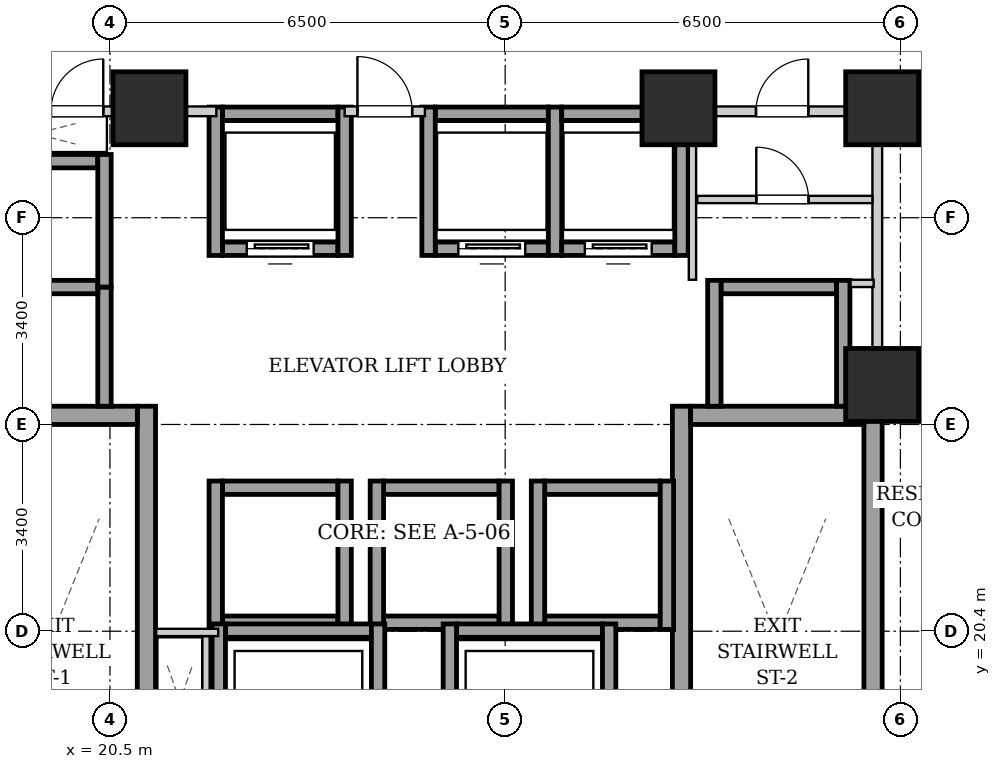
"""IFC4 building model, lengths in metres.
Left out: names, types, materials, properties, quantities, classifications, styles, units other than length and angle.
Written with IfcOpenShell. Run it as: python <this file> out.ifc"""

import sys

from ifc_helpers import new_model, si_unit, direction, frame, frame_2d, origin, origin_2d, place, context, subcontext, project, spatial, rectangle, extrude, element, fill, save


model = new_model("IFC4")
c1 = context("Model", 3, precision=1e-05, world=origin(), true_north=direction((0.0, 1.0)))
c2 = subcontext(c1, "Body", "Model", "MODEL_VIEW")
j1 = project(units=[si_unit("LENGTHUNIT", "METRE"), si_unit("PLANEANGLEUNIT", "RADIAN")], contexts=[c1])
p1 = place(None, origin())
s1 = spatial("IfcSite", under=j1, at=p1, CompositionType="ELEMENT")
p2 = place(p1, origin())
s2 = spatial("IfcBuilding", under=s1, at=p2, CompositionType="ELEMENT")
p3 = place(p2, frame((0.0, 0.0, 41.8)))
s3 = spatial("IfcBuildingStorey", under=s2, at=p3, CompositionType="ELEMENT", Elevation=41.8)
for number, where, z_axis, x_axis in (
    (1, (21.15, 29.0, 0.0), (0.0, 0.0, 1.0), (1.0, 0.0, 0.0)),
    (2, (29.85, 29.0, 0.0), (0.0, 0.0, 1.0), (1.0, 0.0, 0.0)),
    (3, (33.2, 29.0, 0.0), (0.0, 0.0, 1.0), (1.0, 0.0, 0.0)),
    (4, (33.2, 24.45, 0.0), (0.0, 0.0, 1.0), (1.0, 0.0, 0.0)),
):
    element("IfcColumn", number, at=place(p3, frame(where, z_axis=z_axis, x_axis=x_axis)), inside=s3, PredefinedType="COLUMN", context=c2, shape_type="SweptSolid", body=[
        extrude(rectangle(XDim=1.2, YDim=1.2, at=origin_2d()), origin(), (0.0, 0.0, 1.0), 3.2),
    ])
p4 = place(p3, frame((21.1, 15.1, 0.0), z_axis=(0.0, 0.0, 1.0), x_axis=(0.0, 1.0, 0.0)))
e5 = element("IfcWall", 5, at=p4, inside=s3, PredefinedType="SHEAR", context=c2, shape_type="SweptSolid", body=[
    extrude(rectangle(XDim=9.0, YDim=0.3, at=frame_2d((4.5, 0.0))), origin(), (0.0, 0.0, 1.0), 2.94),
])
p5 = place(p3, frame((18.1, 23.95, 0.0), z_axis=(0.0, 0.0, 1.0), x_axis=(1.0, 0.0, 0.0)))
e6 = element("IfcWall", 6, at=p5, inside=s3, PredefinedType="SHEAR", context=c2, shape_type="SweptSolid", body=[
    extrude(rectangle(XDim=2.85, YDim=0.3, at=frame_2d((1.425, 0.0))), origin(), (0.0, 0.0, 1.0), 2.94),
])
for number, where, z_axis, x_axis in (
    (7, (29.9, 15.1, 0.0), (0.0, 0.0, 1.0), (0.0, 1.0, 0.0)),
    (8, (33.05, 15.1, 0.0), (0.0, 0.0, 1.0), (0.0, 1.0, 0.0)),
):
    element("IfcWall", number, at=place(p3, frame(where, z_axis=z_axis, x_axis=x_axis)), inside=s3, PredefinedType="SHEAR", context=c2, shape_type="SweptSolid", body=[
        extrude(rectangle(XDim=9.0, YDim=0.3, at=frame_2d((4.5, 0.0))), origin(), (0.0, 0.0, 1.0), 2.94),
    ])
p6 = place(p3, frame((30.05, 23.95, 0.0), z_axis=(0.0, 0.0, 1.0), x_axis=(1.0, 0.0, 0.0)))
e9 = element("IfcWall", 9, at=p6, inside=s3, PredefinedType="SHEAR", context=c2, shape_type="SweptSolid", body=[
    extrude(rectangle(XDim=2.85, YDim=0.3, at=frame_2d((1.425, 0.0))), origin(), (0.0, 0.0, 1.0), 2.94),
])
p7 = place(p3, frame((22.35, 26.69, 0.0), z_axis=(0.0, 0.0, 1.0), x_axis=(1.0, 0.0, 0.0)))
e10 = element("IfcWall", 10, at=p7, inside=s3, PredefinedType="SHEAR", context=c2, shape_type="SweptSolid", body=[
    extrude(rectangle(XDim=1.9, YDim=0.22, at=frame_2d((0.95, 0.0))), origin(), (0.0, 0.0, 1.0), 2.94),
])
p8 = place(p7, frame((0.4, 0.0, 0.0)))
e11 = element("IfcOpeningElement", 11, at=p8, cuts=e10, PredefinedType="OPENING", context=c2, shape_type="SweptSolid", body=[
    extrude(rectangle(XDim=1.1, YDim=2.15, at=frame_2d((0.55, 1.075))), frame((0.0, 0.12, 0.0), z_axis=(0.0, -1.0, 0.0), x_axis=(1.0, 0.0, 0.0)), (0.0, 0.0, 1.0), 0.24),
])
p9 = place(p3, frame((22.35, 28.91, 0.0), z_axis=(0.0, 0.0, 1.0), x_axis=(1.0, 0.0, 0.0)))
e12 = element("IfcWall", 12, at=p9, inside=s3, PredefinedType="SHEAR", context=c2, shape_type="SweptSolid", body=[
    extrude(rectangle(XDim=1.9, YDim=0.22, at=frame_2d((0.95, 0.0))), origin(), (0.0, 0.0, 1.0), 2.94),
])
for number, where, z_axis, x_axis in (
    (13, (22.24, 26.58, 0.0), (0.0, 0.0, 1.0), (0.0, 1.0, 0.0)),
    (14, (24.36, 26.58, 0.0), (0.0, 0.0, 1.0), (0.0, 1.0, 0.0)),
):
    element("IfcWall", number, at=place(p3, frame(where, z_axis=z_axis, x_axis=x_axis)), inside=s3, PredefinedType="SHEAR", context=c2, shape_type="SweptSolid", body=[
        extrude(rectangle(XDim=2.44, YDim=0.22, at=frame_2d((1.22, 0.0))), origin(), (0.0, 0.0, 1.0), 2.94),
    ])
p10 = place(p3, frame((25.85, 26.69, 0.0), z_axis=(0.0, 0.0, 1.0), x_axis=(1.0, 0.0, 0.0)))
e15 = element("IfcWall", 15, at=p10, inside=s3, PredefinedType="SHEAR", context=c2, shape_type="SweptSolid", body=[
    extrude(rectangle(XDim=1.86, YDim=0.22, at=frame_2d((0.93, 0.0))), origin(), (0.0, 0.0, 1.0), 2.94),
])
p11 = place(p10, frame((0.38, 0.0, 0.0)))
e16 = element("IfcOpeningElement", 16, at=p11, cuts=e15, PredefinedType="OPENING", context=c2, shape_type="SweptSolid", body=[
    extrude(rectangle(XDim=1.1, YDim=2.15, at=frame_2d((0.55, 1.075))), frame((0.0, 0.12, 0.0), z_axis=(0.0, -1.0, 0.0), x_axis=(1.0, 0.0, 0.0)), (0.0, 0.0, 1.0), 0.24),
])
p12 = place(p3, frame((25.85, 28.91, 0.0), z_axis=(0.0, 0.0, 1.0), x_axis=(1.0, 0.0, 0.0)))
e17 = element("IfcWall", 17, at=p12, inside=s3, PredefinedType="SHEAR", context=c2, shape_type="SweptSolid", body=[
    extrude(rectangle(XDim=1.86, YDim=0.22, at=frame_2d((0.93, 0.0))), origin(), (0.0, 0.0, 1.0), 2.94),
])
for number, where, z_axis, x_axis in (
    (18, (25.74, 26.58, 0.0), (0.0, 0.0, 1.0), (0.0, 1.0, 0.0)),
    (19, (27.82, 26.58, 0.0), (0.0, 0.0, 1.0), (0.0, 1.0, 0.0)),
):
    element("IfcWall", number, at=place(p3, frame(where, z_axis=z_axis, x_axis=x_axis)), inside=s3, PredefinedType="SHEAR", context=c2, shape_type="SweptSolid", body=[
        extrude(rectangle(XDim=2.44, YDim=0.22, at=frame_2d((1.22, 0.0))), origin(), (0.0, 0.0, 1.0), 2.94),
    ])
p13 = place(p3, frame((27.93, 26.69, 0.0), z_axis=(0.0, 0.0, 1.0), x_axis=(1.0, 0.0, 0.0)))
e20 = element("IfcWall", 20, at=p13, inside=s3, PredefinedType="SHEAR", context=c2, shape_type="SweptSolid", body=[
    extrude(rectangle(XDim=1.86, YDim=0.22, at=frame_2d((0.93, 0.0))), origin(), (0.0, 0.0, 1.0), 2.94),
])
p14 = place(p13, frame((0.38, 0.0, 0.0)))
e21 = element("IfcOpeningElement", 21, at=p14, cuts=e20, PredefinedType="OPENING", context=c2, shape_type="SweptSolid", body=[
    extrude(rectangle(XDim=1.1, YDim=2.15, at=frame_2d((0.55, 1.075))), frame((0.0, 0.12, 0.0), z_axis=(0.0, -1.0, 0.0), x_axis=(1.0, 0.0, 0.0)), (0.0, 0.0, 1.0), 0.24),
])
p15 = place(p3, frame((27.93, 28.91, 0.0), z_axis=(0.0, 0.0, 1.0), x_axis=(1.0, 0.0, 0.0)))
e22 = element("IfcWall", 22, at=p15, inside=s3, PredefinedType="SHEAR", context=c2, shape_type="SweptSolid", body=[
    extrude(rectangle(XDim=1.86, YDim=0.22, at=frame_2d((0.93, 0.0))), origin(), (0.0, 0.0, 1.0), 2.94),
])
p16 = place(p3, frame((29.9, 26.58, 0.0), z_axis=(0.0, 0.0, 1.0), x_axis=(0.0, 1.0, 0.0)))
e23 = element("IfcWall", 23, at=p16, inside=s3, PredefinedType="SHEAR", context=c2, shape_type="SweptSolid", body=[
    extrude(rectangle(XDim=2.44, YDim=0.22, at=frame_2d((1.22, 0.0))), origin(), (0.0, 0.0, 1.0), 2.94),
])
for number, where, z_axis, x_axis in (
    (24, (22.35, 20.54, 0.0), (0.0, 0.0, 1.0), (1.0, 0.0, 0.0)),
    (25, (22.35, 22.76, 0.0), (0.0, 0.0, 1.0), (1.0, 0.0, 0.0)),
):
    element("IfcWall", number, at=place(p3, frame(where, z_axis=z_axis, x_axis=x_axis)), inside=s3, PredefinedType="SHEAR", context=c2, shape_type="SweptSolid", body=[
        extrude(rectangle(XDim=1.9, YDim=0.22, at=frame_2d((0.95, 0.0))), origin(), (0.0, 0.0, 1.0), 2.94),
    ])
for number, where, z_axis, x_axis in (
    (26, (22.24, 20.43, 0.0), (0.0, 0.0, 1.0), (0.0, 1.0, 0.0)),
    (27, (24.36, 20.43, 0.0), (0.0, 0.0, 1.0), (0.0, 1.0, 0.0)),
):
    element("IfcWall", number, at=place(p3, frame(where, z_axis=z_axis, x_axis=x_axis)), inside=s3, PredefinedType="SHEAR", context=c2, shape_type="SweptSolid", body=[
        extrude(rectangle(XDim=2.44, YDim=0.22, at=frame_2d((1.22, 0.0))), origin(), (0.0, 0.0, 1.0), 2.94),
    ])
for number, where, z_axis, x_axis in (
    (28, (25.0, 20.54, 0.0), (0.0, 0.0, 1.0), (1.0, 0.0, 0.0)),
    (29, (25.0, 22.76, 0.0), (0.0, 0.0, 1.0), (1.0, 0.0, 0.0)),
):
    element("IfcWall", number, at=place(p3, frame(where, z_axis=z_axis, x_axis=x_axis)), inside=s3, PredefinedType="SHEAR", context=c2, shape_type="SweptSolid", body=[
        extrude(rectangle(XDim=1.9, YDim=0.22, at=frame_2d((0.95, 0.0))), origin(), (0.0, 0.0, 1.0), 2.94),
    ])
for number, where, z_axis, x_axis in (
    (30, (24.89, 20.43, 0.0), (0.0, 0.0, 1.0), (0.0, 1.0, 0.0)),
    (31, (27.01, 20.43, 0.0), (0.0, 0.0, 1.0), (0.0, 1.0, 0.0)),
):
    element("IfcWall", number, at=place(p3, frame(where, z_axis=z_axis, x_axis=x_axis)), inside=s3, PredefinedType="SHEAR", context=c2, shape_type="SweptSolid", body=[
        extrude(rectangle(XDim=2.44, YDim=0.22, at=frame_2d((1.22, 0.0))), origin(), (0.0, 0.0, 1.0), 2.94),
    ])
for number, where, z_axis, x_axis in (
    (32, (27.65, 20.54, 0.0), (0.0, 0.0, 1.0), (1.0, 0.0, 0.0)),
    (33, (27.65, 22.76, 0.0), (0.0, 0.0, 1.0), (1.0, 0.0, 0.0)),
):
    element("IfcWall", number, at=place(p3, frame(where, z_axis=z_axis, x_axis=x_axis)), inside=s3, PredefinedType="SHEAR", context=c2, shape_type="SweptSolid", body=[
        extrude(rectangle(XDim=1.9, YDim=0.22, at=frame_2d((0.95, 0.0))), origin(), (0.0, 0.0, 1.0), 2.94),
    ])
for number, where, z_axis, x_axis in (
    (34, (27.54, 20.43, 0.0), (0.0, 0.0, 1.0), (0.0, 1.0, 0.0)),
    (35, (29.66, 20.43, 0.0), (0.0, 0.0, 1.0), (0.0, 1.0, 0.0)),
):
    element("IfcWall", number, at=place(p3, frame(where, z_axis=z_axis, x_axis=x_axis)), inside=s3, PredefinedType="SHEAR", context=c2, shape_type="SweptSolid", body=[
        extrude(rectangle(XDim=2.44, YDim=0.22, at=frame_2d((1.22, 0.0))), origin(), (0.0, 0.0, 1.0), 2.94),
    ])
p17 = place(p3, frame((20.41, 24.1, 0.0), z_axis=(0.0, 0.0, 1.0), x_axis=(0.0, 1.0, 0.0)))
e36 = element("IfcWall", 36, at=p17, inside=s3, PredefinedType="SHEAR", context=c2, shape_type="SweptSolid", body=[
    extrude(rectangle(XDim=1.96, YDim=0.22, at=frame_2d((0.98, 0.0))), origin(), (0.0, 0.0, 1.0), 2.94),
])
for number, where, z_axis, x_axis in (
    (37, (18.4, 26.06, 0.0), (0.0, 0.0, 1.0), (1.0, 0.0, 0.0)),
    (38, (18.4, 28.13, 0.0), (0.0, 0.0, 1.0), (1.0, 0.0, 0.0)),
):
    element("IfcWall", number, at=place(p3, frame(where, z_axis=z_axis, x_axis=x_axis)), inside=s3, PredefinedType="SHEAR", context=c2, shape_type="SweptSolid", body=[
        extrude(rectangle(XDim=1.9, YDim=0.22, at=frame_2d((0.95, 0.0))), origin(), (0.0, 0.0, 1.0), 2.94),
    ])
p18 = place(p3, frame((20.41, 26.06, 0.0), z_axis=(0.0, 0.0, 1.0), x_axis=(0.0, 1.0, 0.0)))
e39 = element("IfcWall", 39, at=p18, inside=s3, PredefinedType="SHEAR", context=c2, shape_type="SweptSolid", body=[
    extrude(rectangle(XDim=2.18, YDim=0.22, at=frame_2d((1.09, 0.0))), origin(), (0.0, 0.0, 1.0), 2.94),
])
p19 = place(p3, frame((30.55, 26.06, 0.0), z_axis=(0.0, 0.0, 1.0), x_axis=(1.0, 0.0, 0.0)))
e40 = element("IfcWall", 40, at=p19, inside=s3, PredefinedType="SHEAR", context=c2, shape_type="SweptSolid", body=[
    extrude(rectangle(XDim=1.9, YDim=0.22, at=frame_2d((0.95, 0.0))), origin(), (0.0, 0.0, 1.0), 2.94),
])
for number, where, z_axis, x_axis in (
    (41, (30.44, 24.1, 0.0), (0.0, 0.0, 1.0), (0.0, 1.0, 0.0)),
    (42, (32.56, 24.1, 0.0), (0.0, 0.0, 1.0), (0.0, 1.0, 0.0)),
):
    element("IfcWall", number, at=place(p3, frame(where, z_axis=z_axis, x_axis=x_axis)), inside=s3, PredefinedType="SHEAR", context=c2, shape_type="SweptSolid", body=[
        extrude(rectangle(XDim=2.07, YDim=0.22, at=frame_2d((1.035, 0.0))), origin(), (0.0, 0.0, 1.0), 2.94),
    ])
p20 = place(p3, frame((22.4, 20.41, 0.0), z_axis=(0.0, 0.0, 1.0), x_axis=(1.0, 0.0, 0.0)))
e43 = element("IfcWall", 43, at=p20, inside=s3, PredefinedType="SHEAR", context=c2, shape_type="SweptSolid", body=[
    extrude(rectangle(XDim=2.4, YDim=0.22, at=frame_2d((1.2, 0.0))), origin(), (0.0, 0.0, 1.0), 2.94),
])
for number, where, z_axis, x_axis in (
    (44, (22.29, 17.98, 0.0), (0.0, 0.0, 1.0), (0.0, 1.0, 0.0)),
    (45, (24.91, 17.98, 0.0), (0.0, 0.0, 1.0), (0.0, 1.0, 0.0)),
):
    element("IfcWall", number, at=place(p3, frame(where, z_axis=z_axis, x_axis=x_axis)), inside=s3, PredefinedType="SHEAR", context=c2, shape_type="SweptSolid", body=[
        extrude(rectangle(XDim=2.54, YDim=0.22, at=frame_2d((1.27, 0.0))), origin(), (0.0, 0.0, 1.0), 2.94),
    ])
p21 = place(p3, frame((26.2, 20.41, 0.0), z_axis=(0.0, 0.0, 1.0), x_axis=(1.0, 0.0, 0.0)))
e46 = element("IfcWall", 46, at=p21, inside=s3, PredefinedType="SHEAR", context=c2, shape_type="SweptSolid", body=[
    extrude(rectangle(XDim=2.4, YDim=0.22, at=frame_2d((1.2, 0.0))), origin(), (0.0, 0.0, 1.0), 2.94),
])
for number, where, z_axis, x_axis in (
    (47, (26.09, 17.98, 0.0), (0.0, 0.0, 1.0), (0.0, 1.0, 0.0)),
    (48, (28.71, 17.98, 0.0), (0.0, 0.0, 1.0), (0.0, 1.0, 0.0)),
):
    element("IfcWall", number, at=place(p3, frame(where, z_axis=z_axis, x_axis=x_axis)), inside=s3, PredefinedType="SHEAR", context=c2, shape_type="SweptSolid", body=[
        extrude(rectangle(XDim=2.54, YDim=0.22, at=frame_2d((1.27, 0.0))), origin(), (0.0, 0.0, 1.0), 2.94),
    ])
p22 = place(p3, frame((33.12, 24.12, 0.0), z_axis=(0.0, 0.0, 1.0), x_axis=(0.0, 1.0, 0.0)))
e49 = element("IfcWall", 49, at=p22, inside=s3, PredefinedType="PARTITIONING", context=c2, shape_type="SweptSolid", body=[
    extrude(rectangle(XDim=4.76, YDim=0.16, at=frame_2d((2.38, 0.0))), origin(), (0.0, 0.0, 1.0), 2.94),
])
p23 = place(p3, frame((24.36, 28.95, 0.0), z_axis=(0.0, 0.0, 1.0), x_axis=(1.0, 0.0, 0.0)))
e50 = element("IfcWall", 50, at=p23, inside=s3, PredefinedType="PARTITIONING", context=c2, shape_type="SweptSolid", body=[
    extrude(rectangle(XDim=1.32, YDim=0.16, at=frame_2d((0.66, 0.0))), origin(), (0.0, 0.0, 1.0), 2.155),
])
p24 = place(p23, frame((0.21, 0.0, 0.0)))
e51 = element("IfcOpeningElement", 51, at=p24, cuts=e50, PredefinedType="OPENING", context=c2, shape_type="SweptSolid", body=[
    extrude(rectangle(XDim=0.9, YDim=2.05, at=frame_2d((0.45, 1.025))), frame((0.0, 0.09, 0.0), z_axis=(0.0, -1.0, 0.0), x_axis=(1.0, 0.0, 0.0)), (0.0, 0.0, 1.0), 0.18),
])
p25 = place(p3, frame((17.96, 28.95, 0.0), z_axis=(0.0, 0.0, 1.0), x_axis=(1.0, 0.0, 0.0)))
e52 = element("IfcWall", 52, at=p25, inside=s3, PredefinedType="PARTITIONING", context=c2, shape_type="SweptSolid", body=[
    extrude(rectangle(XDim=4.29, YDim=0.16, at=frame_2d((2.145, 0.0))), origin(), (0.0, 0.0, 1.0), 2.155),
])
p26 = place(p25, frame((1.57, 0.0, 0.0)))
e53 = element("IfcOpeningElement", 53, at=p26, cuts=e52, PredefinedType="OPENING", context=c2, shape_type="SweptSolid", body=[
    extrude(rectangle(XDim=0.86, YDim=2.05, at=frame_2d((0.43, 1.025))), frame((0.0, 0.09, 0.0), z_axis=(0.0, -1.0, 0.0), x_axis=(1.0, 0.0, 0.0)), (0.0, 0.0, 1.0), 0.18),
])
p27 = place(p3, frame((22.08, 18.2, 0.0), z_axis=(0.0, 0.0, 1.0), x_axis=(0.0, 1.0, 0.0)))
e54 = element("IfcWall", 54, at=p27, inside=s3, PredefinedType="PARTITIONING", context=c2, shape_type="SweptSolid", body=[
    extrude(rectangle(XDim=2.12, YDim=0.12, at=frame_2d((1.06, 0.0))), origin(), (0.0, 0.0, 1.0), 2.94),
])
p28 = place(p3, frame((22.28, 20.38, 0.0), z_axis=(0.0, 0.0, 1.0), x_axis=(-1.0, 0.0, 0.0)))
e55 = element("IfcWall", 55, at=p28, inside=s3, PredefinedType="PARTITIONING", context=c2, shape_type="SweptSolid", body=[
    extrude(rectangle(XDim=1.02, YDim=0.12, at=frame_2d((0.51, 0.0))), origin(), (0.0, 0.0, 1.0), 2.94),
])
p29 = place(p3, frame((30.08, 26.18, 0.0), z_axis=(0.0, 0.0, 1.0), x_axis=(0.0, 1.0, 0.0)))
e56 = element("IfcWall", 56, at=p29, inside=s3, PredefinedType="PARTITIONING", context=c2, shape_type="SweptSolid", body=[
    extrude(rectangle(XDim=2.68, YDim=0.12, at=frame_2d((1.34, 0.0))), origin(), (0.0, 0.0, 1.0), 2.94),
])
p30 = place(p3, frame((32.68, 26.12, 0.0), z_axis=(0.0, 0.0, 1.0), x_axis=(1.0, 0.0, 0.0)))
e57 = element("IfcWall", 57, at=p30, inside=s3, PredefinedType="PARTITIONING", context=c2, shape_type="SweptSolid", body=[
    extrude(rectangle(XDim=0.38, YDim=0.12, at=frame_2d((0.19, 0.0))), origin(), (0.0, 0.0, 1.0), 2.94),
])
p31 = place(p3, frame((30.16, 27.5, 0.0), z_axis=(0.0, 0.0, 1.0), x_axis=(1.0, 0.0, 0.0)))
e58 = element("IfcWall", 58, at=p31, inside=s3, PredefinedType="PARTITIONING", context=c2, shape_type="SweptSolid", body=[
    extrude(rectangle(XDim=2.88, YDim=0.12, at=frame_2d((1.44, 0.0))), origin(), (0.0, 0.0, 1.0), 2.94),
])
p32 = place(p31, frame((0.97, 0.0, 0.0)))
e59 = element("IfcOpeningElement", 59, at=p32, cuts=e58, PredefinedType="OPENING", context=c2, shape_type="SweptSolid", body=[
    extrude(rectangle(XDim=0.86, YDim=2.05, at=frame_2d((0.43, 1.025))), frame((0.0, 0.07, 0.0), z_axis=(0.0, -1.0, 0.0), x_axis=(1.0, 0.0, 0.0)), (0.0, 0.0, 1.0), 0.14),
])
p33 = place(p3, frame((30.08, 28.95, 0.0), z_axis=(0.0, 0.0, 1.0), x_axis=(1.0, 0.0, 0.0)))
e60 = element("IfcWall", 60, at=p33, inside=s3, PredefinedType="PARTITIONING", context=c2, shape_type="SweptSolid", body=[
    extrude(rectangle(XDim=2.96, YDim=0.16, at=frame_2d((1.48, 0.0))), origin(), (0.0, 0.0, 1.0), 2.94),
])
p34 = place(p33, frame((1.045, 0.0, 0.0)))
e61 = element("IfcOpeningElement", 61, at=p34, cuts=e60, PredefinedType="OPENING", context=c2, shape_type="SweptSolid", body=[
    extrude(rectangle(XDim=0.86, YDim=2.05, at=frame_2d((0.43, 1.025))), frame((0.0, 0.09, 0.0), z_axis=(0.0, -1.0, 0.0), x_axis=(1.0, 0.0, 0.0)), (0.0, 0.0, 1.0), 0.18),
])
p35 = place(p8, origin())
e62 = element("IfcDoor", 62, at=p35, inside=s3, OperationType="SLIDING_TO_LEFT", PredefinedType="DOOR", context=c2, shape_type="SweptSolid", body=[
    extrude(rectangle(XDim=1.1, YDim=2.15, at=frame_2d((0.55, 1.075))), frame((0.0, 0.025, 0.0), z_axis=(0.0, -1.0, 0.0), x_axis=(1.0, 0.0, 0.0)), (0.0, 0.0, 1.0), 0.05),
])
fill(e11, e62)
p36 = place(p11, origin())
e63 = element("IfcDoor", 63, at=p36, inside=s3, OperationType="SLIDING_TO_LEFT", PredefinedType="DOOR", context=c2, shape_type="SweptSolid", body=[
    extrude(rectangle(XDim=1.1, YDim=2.15, at=frame_2d((0.55, 1.075))), frame((0.0, 0.025, 0.0), z_axis=(0.0, -1.0, 0.0), x_axis=(1.0, 0.0, 0.0)), (0.0, 0.0, 1.0), 0.05),
])
fill(e16, e63)
p37 = place(p14, origin())
e64 = element("IfcDoor", 64, at=p37, inside=s3, OperationType="SLIDING_TO_LEFT", PredefinedType="DOOR", context=c2, shape_type="SweptSolid", body=[
    extrude(rectangle(XDim=1.1, YDim=2.15, at=frame_2d((0.55, 1.075))), frame((0.0, 0.025, 0.0), z_axis=(0.0, -1.0, 0.0), x_axis=(1.0, 0.0, 0.0)), (0.0, 0.0, 1.0), 0.05),
])
fill(e21, e64)
p38 = place(p24, origin())
e65 = element("IfcDoor", 65, at=p38, inside=s3, OperationType="SINGLE_SWING_LEFT", PredefinedType="DOOR", context=c2, shape_type="SweptSolid", body=[
    extrude(rectangle(XDim=0.9, YDim=2.05, at=frame_2d((0.45, 1.025))), frame((0.0, 0.025, 0.0), z_axis=(0.0, -1.0, 0.0), x_axis=(1.0, 0.0, 0.0)), (0.0, 0.0, 1.0), 0.05),
])
fill(e51, e65)
p39 = place(p26, origin())
e66 = element("IfcDoor", 66, at=p39, inside=s3, OperationType="SINGLE_SWING_RIGHT", PredefinedType="DOOR", context=c2, shape_type="SweptSolid", body=[
    extrude(rectangle(XDim=0.86, YDim=2.05, at=frame_2d((0.43, 1.025))), frame((0.0, 0.025, 0.0), z_axis=(0.0, -1.0, 0.0), x_axis=(1.0, 0.0, 0.0)), (0.0, 0.0, 1.0), 0.05),
])
fill(e53, e66)
p40 = place(p32, origin())
e67 = element("IfcDoor", 67, at=p40, inside=s3, OperationType="SINGLE_SWING_LEFT", PredefinedType="DOOR", context=c2, shape_type="SweptSolid", body=[
    extrude(rectangle(XDim=0.86, YDim=2.05, at=frame_2d((0.43, 1.025))), frame((0.0, 0.025, 0.0), z_axis=(0.0, -1.0, 0.0), x_axis=(1.0, 0.0, 0.0)), (0.0, 0.0, 1.0), 0.05),
])
fill(e59, e67)
p41 = place(p34, origin())
e68 = element("IfcDoor", 68, at=p41, inside=s3, OperationType="SINGLE_SWING_RIGHT", PredefinedType="DOOR", context=c2, shape_type="SweptSolid", body=[
    extrude(rectangle(XDim=0.86, YDim=2.05, at=frame_2d((0.43, 1.025))), frame((0.0, 0.025, 0.0), z_axis=(0.0, -1.0, 0.0), x_axis=(1.0, 0.0, 0.0)), (0.0, 0.0, 1.0), 0.05),
])
fill(e61, e68)
save(model, sys.argv[1])
